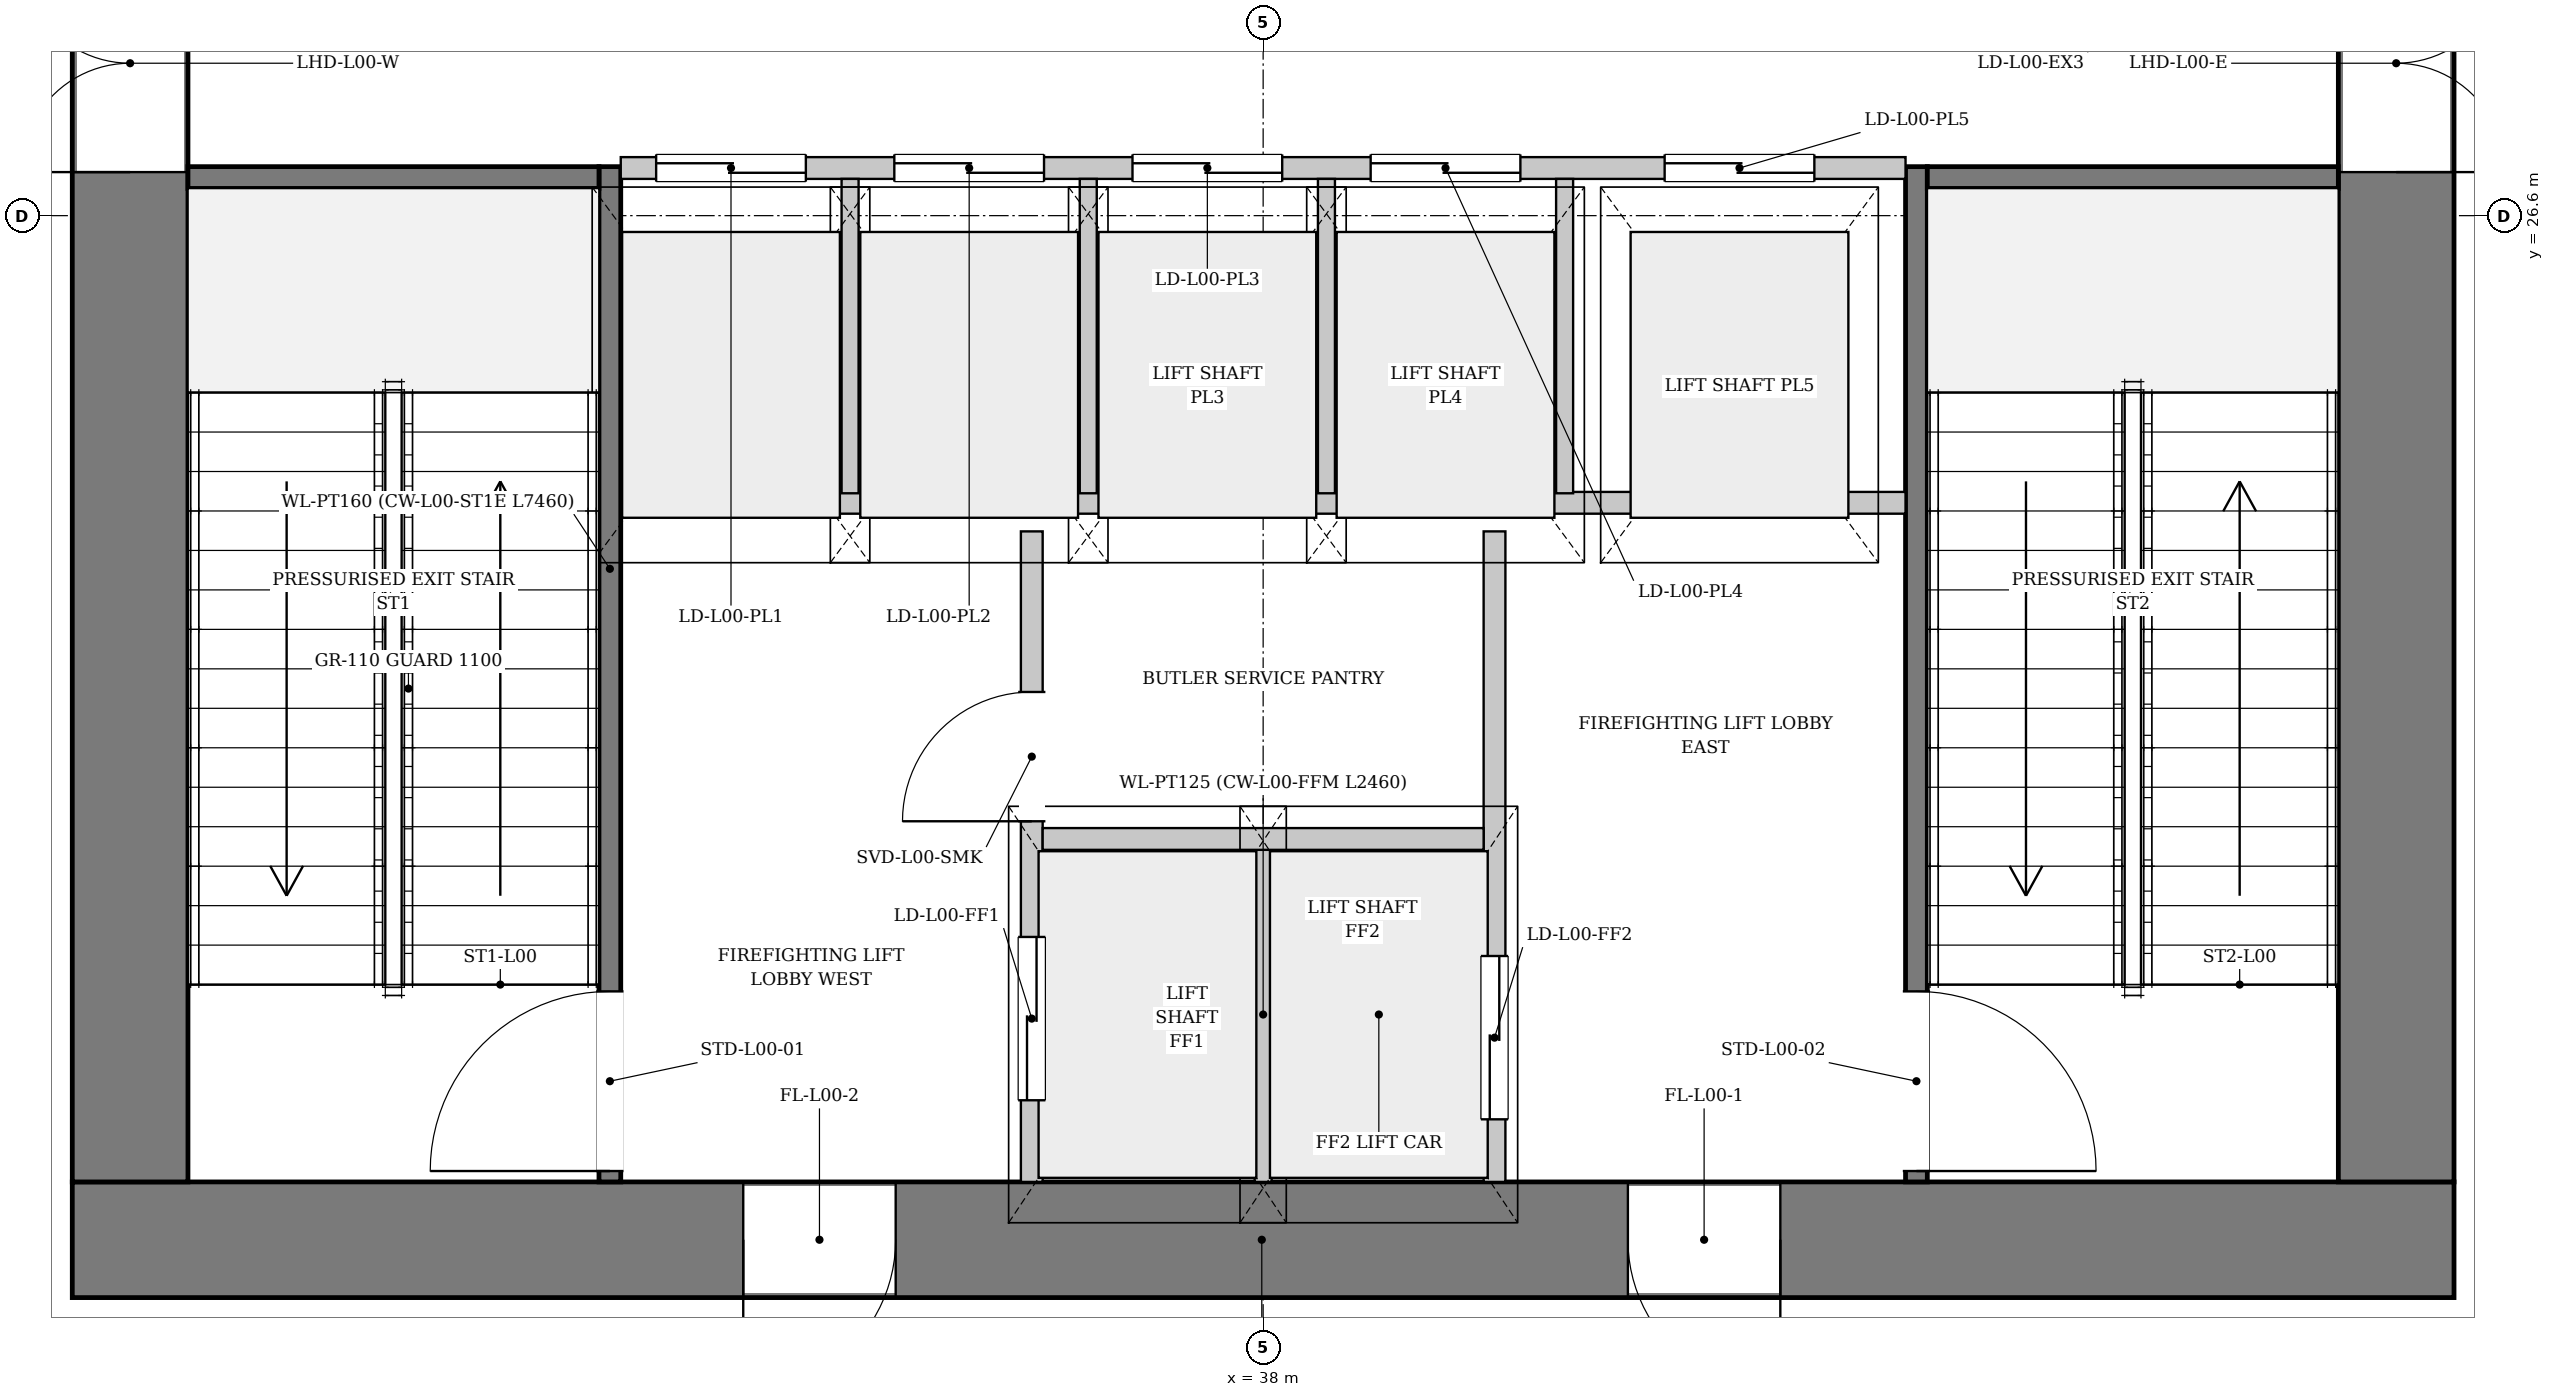
"""IFC4 building model, lengths in metres.
Left out: names, types, materials, properties, quantities, classifications, styles, units other than length and angle.
Written with IfcOpenShell. Run it as: python <this file> out.ifc"""

import sys

from ifc_helpers import new_model, si_unit, direction, frame, frame_2d, origin, place, context, subcontext, project, spatial, rectangle, extrude, source, transform, mapped, element, fill, save


model = new_model("IFC4")
c1 = context("Model", 3, precision=1e-05, world=origin(), true_north=direction((0.0, 1.0)))
c2 = subcontext(c1, "Body", "Model", "MODEL_VIEW")
j1 = project(units=[si_unit("LENGTHUNIT", "METRE"), si_unit("PLANEANGLEUNIT", "RADIAN")], contexts=[c1])
p1 = place(None, origin())
s1 = spatial("IfcSite", under=j1, at=p1, CompositionType="ELEMENT")
p2 = place(p1, origin())
s2 = spatial("IfcBuilding", under=s1, at=p2, CompositionType="ELEMENT")
p3 = place(p2, origin())
s3 = spatial("IfcBuildingStorey", under=s2, at=p3, CompositionType="ELEMENT", Elevation=0.0)
p4 = place(p3, frame((46.75, 19.075, 0.0), z_axis=(0.0, 0.0, 1.0), x_axis=(-1.0, 0.0, 0.0)))
e1 = element("IfcWall", 1, at=p4, inside=s3, PredefinedType="SHEAR", context=c2, shape_type="SweptSolid", body=[
    extrude(rectangle(XDim=17.5, YDim=0.85, at=frame_2d((8.75, 0.0))), origin(), (0.0, 0.0, 1.0), 5.08),
])
p5 = place(p4, frame((4.95, 0.0, 0.0)))
e2 = element("IfcOpeningElement", 2, at=p5, cuts=e1, PredefinedType="OPENING", context=c2, shape_type="SweptSolid", body=[
    extrude(rectangle(XDim=1.12, YDim=2.25, at=frame_2d((0.56, 1.125))), frame((0.0, 0.435, 0.0), z_axis=(0.0, -1.0, 0.0), x_axis=(1.0, 0.0, 0.0)), (0.0, 0.0, 1.0), 0.87),
])
p6 = place(p4, frame((11.45, 0.0, 0.0)))
e3 = element("IfcOpeningElement", 3, at=p6, cuts=e1, PredefinedType="OPENING", context=c2, shape_type="SweptSolid", body=[
    extrude(rectangle(XDim=1.12, YDim=2.25, at=frame_2d((0.56, 1.125))), frame((0.0, 0.435, 0.0), z_axis=(0.0, -1.0, 0.0), x_axis=(1.0, 0.0, 0.0)), (0.0, 0.0, 1.0), 0.87),
])
p7 = place(p3, frame((29.675, 19.5, 0.0), z_axis=(0.0, 0.0, 1.0), x_axis=(0.0, 1.0, 0.0)))
e4 = element("IfcWall", 4, at=p7, inside=s3, PredefinedType="SHEAR", context=c2, shape_type="SweptSolid", body=[
    extrude(rectangle(XDim=14.2, YDim=0.85, at=frame_2d((7.1, 0.0))), origin(), (0.0, 0.0, 1.0), 5.08),
])
p8 = place(p7, frame((7.42, 0.0, 0.0)))
e5 = element("IfcOpeningElement", 5, at=p8, cuts=e4, PredefinedType="OPENING", context=c2, shape_type="SweptSolid", body=[
    extrude(rectangle(XDim=1.6, YDim=2.2, at=frame_2d((0.8, 1.1))), frame((0.0, 0.435, 0.0), z_axis=(0.0, -1.0, 0.0), x_axis=(1.0, 0.0, 0.0)), (0.0, 0.0, 1.0), 0.87),
])
p9 = place(p3, frame((46.325, 33.7, 0.0), z_axis=(0.0, 0.0, 1.0), x_axis=(0.0, -1.0, 0.0)))
e6 = element("IfcWall", 6, at=p9, inside=s3, PredefinedType="SHEAR", context=c2, shape_type="SweptSolid", body=[
    extrude(rectangle(XDim=14.2, YDim=0.85, at=frame_2d((7.1, 0.0))), origin(), (0.0, 0.0, 1.0), 5.08),
])
p10 = place(p9, frame((5.18, 0.0, 0.0)))
e7 = element("IfcOpeningElement", 7, at=p10, cuts=e6, PredefinedType="OPENING", context=c2, shape_type="SweptSolid", body=[
    extrude(rectangle(XDim=1.6, YDim=2.2, at=frame_2d((0.8, 1.1))), frame((0.0, 0.435, 0.0), z_axis=(0.0, -1.0, 0.0), x_axis=(1.0, 0.0, 0.0)), (0.0, 0.0, 1.0), 0.87),
])
p11 = place(p3, frame((33.2, 19.5, 0.0), z_axis=(0.0, 0.0, 1.0), x_axis=(0.0, 1.0, 0.0)))
e8 = element("IfcWall", 8, at=p11, inside=s3, PredefinedType="PARTITIONING", context=c2, shape_type="SweptSolid", body=[
    extrude(rectangle(XDim=7.46, YDim=0.16, at=frame_2d((3.73, 0.0))), origin(), (0.0, 0.0, 1.0), 5.08),
])
p12 = place(p11, frame((0.08, 0.0, 0.0)))
e9 = element("IfcOpeningElement", 9, at=p12, cuts=e8, PredefinedType="OPENING", context=c2, shape_type="SweptSolid", body=[
    extrude(rectangle(XDim=1.32, YDim=2.2, at=frame_2d((0.66, 1.1))), frame((0.0, 0.09, 0.0), z_axis=(0.0, -1.0, 0.0), x_axis=(1.0, 0.0, 0.0)), (0.0, 0.0, 1.0), 0.18),
])
p13 = place(p3, frame((30.1, 26.88, 0.0), z_axis=(0.0, 0.0, 1.0), x_axis=(1.0, 0.0, 0.0)))
e10 = element("IfcWall", 10, at=p13, inside=s3, PredefinedType="PARTITIONING", context=c2, shape_type="SweptSolid", body=[
    extrude(rectangle(XDim=3.02, YDim=0.16, at=frame_2d((1.51, 0.0))), origin(), (0.0, 0.0, 1.0), 5.08),
])
p14 = place(p3, frame((42.8, 26.96, 0.0), z_axis=(0.0, 0.0, 1.0), x_axis=(0.0, -1.0, 0.0)))
e11 = element("IfcWall", 11, at=p14, inside=s3, PredefinedType="PARTITIONING", context=c2, shape_type="SweptSolid", body=[
    extrude(rectangle(XDim=7.46, YDim=0.16, at=frame_2d((3.73, 0.0))), origin(), (0.0, 0.0, 1.0), 5.08),
])
p15 = place(p14, frame((6.06, 0.0, 0.0)))
e12 = element("IfcOpeningElement", 12, at=p15, cuts=e11, PredefinedType="OPENING", context=c2, shape_type="SweptSolid", body=[
    extrude(rectangle(XDim=1.32, YDim=2.2, at=frame_2d((0.66, 1.1))), frame((0.0, 0.09, 0.0), z_axis=(0.0, -1.0, 0.0), x_axis=(1.0, 0.0, 0.0)), (0.0, 0.0, 1.0), 0.18),
])
p16 = place(p3, frame((42.88, 26.88, 0.0), z_axis=(0.0, 0.0, 1.0), x_axis=(1.0, 0.0, 0.0)))
e13 = element("IfcWall", 13, at=p16, inside=s3, PredefinedType="PARTITIONING", context=c2, shape_type="SweptSolid", body=[
    extrude(rectangle(XDim=3.02, YDim=0.16, at=frame_2d((1.51, 0.0))), origin(), (0.0, 0.0, 1.0), 5.08),
])
p17 = place(p3, frame((36.3, 19.5, 0.0), z_axis=(0.0, 0.0, 1.0), x_axis=(0.0, 1.0, 0.0)))
e14 = element("IfcWall", 14, at=p17, inside=s3, PredefinedType="PARTITIONING", context=c2, shape_type="SweptSolid", body=[
    extrude(rectangle(XDim=4.78, YDim=0.16, at=frame_2d((2.39, 0.0))), origin(), (0.0, 0.0, 1.0), 5.08),
])
p18 = place(p17, frame((0.6, 0.0, 0.0)))
e15 = element("IfcOpeningElement", 15, at=p18, cuts=e14, PredefinedType="OPENING", context=c2, shape_type="SweptSolid", body=[
    extrude(rectangle(XDim=1.2, YDim=2.2, at=frame_2d((0.6, 1.1))), frame((0.0, 0.09, 0.0), z_axis=(0.0, -1.0, 0.0), x_axis=(1.0, 0.0, 0.0)), (0.0, 0.0, 1.0), 0.18),
])
p19 = place(p17, frame((2.65, 0.0, 0.0)))
e16 = element("IfcOpeningElement", 16, at=p19, cuts=e14, PredefinedType="OPENING", context=c2, shape_type="SweptSolid", body=[
    extrude(rectangle(XDim=0.95, YDim=2.1, at=frame_2d((0.475, 1.05))), frame((0.0, 0.09, 0.0), z_axis=(0.0, -1.0, 0.0), x_axis=(1.0, 0.0, 0.0)), (0.0, 0.0, 1.0), 0.18),
])
p20 = place(p3, frame((39.7, 24.28, 0.0), z_axis=(0.0, 0.0, 1.0), x_axis=(0.0, -1.0, 0.0)))
e17 = element("IfcWall", 17, at=p20, inside=s3, PredefinedType="PARTITIONING", context=c2, shape_type="SweptSolid", body=[
    extrude(rectangle(XDim=4.78, YDim=0.16, at=frame_2d((2.39, 0.0))), origin(), (0.0, 0.0, 1.0), 5.08),
])
p21 = place(p20, frame((3.12, 0.0, 0.0)))
e18 = element("IfcOpeningElement", 18, at=p21, cuts=e17, PredefinedType="OPENING", context=c2, shape_type="SweptSolid", body=[
    extrude(rectangle(XDim=1.2, YDim=2.2, at=frame_2d((0.6, 1.1))), frame((0.0, 0.09, 0.0), z_axis=(0.0, -1.0, 0.0), x_axis=(1.0, 0.0, 0.0)), (0.0, 0.0, 1.0), 0.18),
])
p22 = place(p3, frame((38.0, 19.5, 0.0), z_axis=(0.0, 0.0, 1.0), x_axis=(0.0, 1.0, 0.0)))
e19 = element("IfcWall", 19, at=p22, inside=s3, PredefinedType="PARTITIONING", context=c2, shape_type="SweptSolid", body=[
    extrude(rectangle(XDim=2.46, YDim=0.125, at=frame_2d((1.23, 0.0))), origin(), (0.0, 0.0, 1.0), 5.08),
])
p23 = place(p3, frame((36.38, 22.02, 0.0), z_axis=(0.0, 0.0, 1.0), x_axis=(1.0, 0.0, 0.0)))
e20 = element("IfcWall", 20, at=p23, inside=s3, PredefinedType="PARTITIONING", context=c2, shape_type="SweptSolid", body=[
    extrude(rectangle(XDim=3.24, YDim=0.16, at=frame_2d((1.62, 0.0))), origin(), (0.0, 0.0, 1.0), 5.08),
])
p24 = place(p3, frame((33.28, 24.49, 0.0), z_axis=(0.0, 0.0, 1.0), x_axis=(1.0, 0.0, 0.0)))
e21 = element("IfcWall", 21, at=p24, inside=s3, PredefinedType="PARTITIONING", context=c2, shape_type="SweptSolid", body=[
    extrude(rectangle(XDim=9.44, YDim=0.16, at=frame_2d((4.72, 0.0))), origin(), (0.0, 0.0, 1.0), 5.08),
])
p25 = place(p3, frame((33.28, 26.95, 0.0), z_axis=(0.0, 0.0, 1.0), x_axis=(1.0, 0.0, 0.0)))
e22 = element("IfcWall", 22, at=p25, inside=s3, PredefinedType="PARTITIONING", context=c2, shape_type="SweptSolid", body=[
    extrude(rectangle(XDim=9.44, YDim=0.16, at=frame_2d((4.72, 0.0))), origin(), (0.0, 0.0, 1.0), 5.08),
])
p26 = place(p25, frame((0.26, 0.0, 0.0)))
e23 = element("IfcOpeningElement", 23, at=p26, cuts=e22, PredefinedType="OPENING", context=c2, shape_type="SweptSolid", body=[
    extrude(rectangle(XDim=1.1, YDim=2.2, at=frame_2d((0.55, 1.1))), frame((0.0, 0.09, 0.0), z_axis=(0.0, -1.0, 0.0), x_axis=(1.0, 0.0, 0.0)), (0.0, 0.0, 1.0), 0.18),
])
p27 = place(p25, frame((2.01, 0.0, 0.0)))
e24 = element("IfcOpeningElement", 24, at=p27, cuts=e22, PredefinedType="OPENING", context=c2, shape_type="SweptSolid", body=[
    extrude(rectangle(XDim=1.1, YDim=2.2, at=frame_2d((0.55, 1.1))), frame((0.0, 0.09, 0.0), z_axis=(0.0, -1.0, 0.0), x_axis=(1.0, 0.0, 0.0)), (0.0, 0.0, 1.0), 0.18),
])
p28 = place(p25, frame((3.76, 0.0, 0.0)))
e25 = element("IfcOpeningElement", 25, at=p28, cuts=e22, PredefinedType="OPENING", context=c2, shape_type="SweptSolid", body=[
    extrude(rectangle(XDim=1.1, YDim=2.2, at=frame_2d((0.55, 1.1))), frame((0.0, 0.09, 0.0), z_axis=(0.0, -1.0, 0.0), x_axis=(1.0, 0.0, 0.0)), (0.0, 0.0, 1.0), 0.18),
])
p29 = place(p25, frame((5.51, 0.0, 0.0)))
e26 = element("IfcOpeningElement", 26, at=p29, cuts=e22, PredefinedType="OPENING", context=c2, shape_type="SweptSolid", body=[
    extrude(rectangle(XDim=1.1, YDim=2.2, at=frame_2d((0.55, 1.1))), frame((0.0, 0.09, 0.0), z_axis=(0.0, -1.0, 0.0), x_axis=(1.0, 0.0, 0.0)), (0.0, 0.0, 1.0), 0.18),
])
p30 = place(p25, frame((7.67, 0.0, 0.0)))
e27 = element("IfcOpeningElement", 27, at=p30, cuts=e22, PredefinedType="OPENING", context=c2, shape_type="SweptSolid", body=[
    extrude(rectangle(XDim=1.1, YDim=2.2, at=frame_2d((0.55, 1.1))), frame((0.0, 0.09, 0.0), z_axis=(0.0, -1.0, 0.0), x_axis=(1.0, 0.0, 0.0)), (0.0, 0.0, 1.0), 0.18),
])
for number, where, z_axis, x_axis in (
    (28, (34.965, 24.56, 0.0), (0.0, 0.0, 1.0), (0.0, 1.0, 0.0)),
    (29, (36.715, 24.56, 0.0), (0.0, 0.0, 1.0), (0.0, 1.0, 0.0)),
    (30, (38.465, 24.56, 0.0), (0.0, 0.0, 1.0), (0.0, 1.0, 0.0)),
    (31, (40.215, 24.56, 0.0), (0.0, 0.0, 1.0), (0.0, 1.0, 0.0)),
):
    element("IfcWall", number, at=place(p3, frame(where, z_axis=z_axis, x_axis=x_axis)), inside=s3, PredefinedType="PARTITIONING", context=c2, shape_type="SweptSolid", body=[
        extrude(rectangle(XDim=2.31, YDim=0.125, at=frame_2d((1.155, 0.0))), origin(), (0.0, 0.0, 1.0), 5.08),
    ])
m1 = source(origin(), c2, "Body", "SweptSolid", [
    extrude(rectangle(XDim=1.12, YDim=2.25, at=frame_2d((0.56, 1.125))), frame((0.0, 0.025, 0.0), z_axis=(0.0, -1.0, 0.0), x_axis=(1.0, 0.0, 0.0)), (0.0, 0.0, 1.0), 0.05),
])
p31 = place(p5, origin())
e32 = element("IfcDoor", 32, at=p31, inside=s3, OperationType="SINGLE_SWING_LEFT", PredefinedType="DOOR", context=c2, shape_type="MappedRepresentation", body=[
    mapped(m1, transform((0.0, 0.0, 0.0), x_axis=(1.0, 0.0, 0.0), y_axis=(0.0, 1.0, 0.0), z_axis=(0.0, 0.0, 1.0), scale=1.0)),
])
fill(e2, e32)
p32 = place(p6, origin())
e33 = element("IfcDoor", 33, at=p32, inside=s3, OperationType="SINGLE_SWING_RIGHT", PredefinedType="DOOR", context=c2, shape_type="MappedRepresentation", body=[
    mapped(m1, transform((0.0, 0.0, 0.0), x_axis=(1.0, 0.0, 0.0), y_axis=(0.0, 1.0, 0.0), z_axis=(0.0, 0.0, 1.0), scale=1.0)),
])
fill(e3, e33)
m2 = source(origin(), c2, "Body", "SweptSolid", [
    extrude(rectangle(XDim=1.6, YDim=2.2, at=frame_2d((0.8, 1.1))), frame((0.0, 0.025, 0.0), z_axis=(0.0, -1.0, 0.0), x_axis=(1.0, 0.0, 0.0)), (0.0, 0.0, 1.0), 0.05),
])
p33 = place(p8, origin())
e34 = element("IfcDoor", 34, at=p33, inside=s3, OperationType="DOUBLE_DOOR_SINGLE_SWING", PredefinedType="DOOR", context=c2, shape_type="MappedRepresentation", body=[
    mapped(m2, transform((0.0, 0.0, 0.0), x_axis=(1.0, 0.0, 0.0), y_axis=(0.0, 1.0, 0.0), z_axis=(0.0, 0.0, 1.0), scale=1.0)),
])
fill(e5, e34)
p34 = place(p10, origin())
e35 = element("IfcDoor", 35, at=p34, inside=s3, OperationType="DOUBLE_DOOR_SINGLE_SWING", PredefinedType="DOOR", context=c2, shape_type="MappedRepresentation", body=[
    mapped(m2, transform((0.0, 0.0, 0.0), x_axis=(1.0, 0.0, 0.0), y_axis=(0.0, 1.0, 0.0), z_axis=(0.0, 0.0, 1.0), scale=1.0)),
])
fill(e7, e35)
m3 = source(origin(), c2, "Body", "SweptSolid", [
    extrude(rectangle(XDim=1.32, YDim=2.2, at=frame_2d((0.66, 1.1))), frame((0.0, 0.025, 0.0), z_axis=(0.0, -1.0, 0.0), x_axis=(1.0, 0.0, 0.0)), (0.0, 0.0, 1.0), 0.05),
])
p35 = place(p12, origin())
e36 = element("IfcDoor", 36, at=p35, inside=s3, OperationType="SINGLE_SWING_LEFT", PredefinedType="DOOR", context=c2, shape_type="MappedRepresentation", body=[
    mapped(m3, transform((0.0, 0.0, 0.0), x_axis=(1.0, 0.0, 0.0), y_axis=(0.0, 1.0, 0.0), z_axis=(0.0, 0.0, 1.0), scale=1.0)),
])
fill(e9, e36)
p36 = place(p15, origin())
e37 = element("IfcDoor", 37, at=p36, inside=s3, OperationType="SINGLE_SWING_RIGHT", PredefinedType="DOOR", context=c2, shape_type="MappedRepresentation", body=[
    mapped(m3, transform((0.0, 0.0, 0.0), x_axis=(1.0, 0.0, 0.0), y_axis=(0.0, 1.0, 0.0), z_axis=(0.0, 0.0, 1.0), scale=1.0)),
])
fill(e12, e37)
m4 = source(origin(), c2, "Body", "SweptSolid", [
    extrude(rectangle(XDim=1.2, YDim=2.2, at=frame_2d((0.6, 1.1))), frame((0.0, 0.025, 0.0), z_axis=(0.0, -1.0, 0.0), x_axis=(1.0, 0.0, 0.0)), (0.0, 0.0, 1.0), 0.05),
])
p37 = place(p18, origin())
e38 = element("IfcDoor", 38, at=p37, inside=s3, OperationType="DOUBLE_DOOR_SLIDING", PredefinedType="DOOR", context=c2, shape_type="MappedRepresentation", body=[
    mapped(m4, transform((0.0, 0.0, 0.0), x_axis=(1.0, 0.0, 0.0), y_axis=(0.0, 1.0, 0.0), z_axis=(0.0, 0.0, 1.0), scale=1.0)),
])
fill(e15, e38)
m5 = source(origin(), c2, "Body", "SweptSolid", [
    extrude(rectangle(XDim=0.95, YDim=2.1, at=frame_2d((0.475, 1.05))), frame((0.0, 0.025, 0.0), z_axis=(0.0, -1.0, 0.0), x_axis=(1.0, 0.0, 0.0)), (0.0, 0.0, 1.0), 0.05),
])
p38 = place(p19, origin())
e39 = element("IfcDoor", 39, at=p38, inside=s3, OperationType="SINGLE_SWING_LEFT", PredefinedType="DOOR", context=c2, shape_type="MappedRepresentation", body=[
    mapped(m5, transform((0.0, 0.0, 0.0), x_axis=(1.0, 0.0, 0.0), y_axis=(0.0, 1.0, 0.0), z_axis=(0.0, 0.0, 1.0), scale=1.0)),
])
fill(e16, e39)
p39 = place(p21, origin())
e40 = element("IfcDoor", 40, at=p39, inside=s3, OperationType="DOUBLE_DOOR_SLIDING", PredefinedType="DOOR", context=c2, shape_type="MappedRepresentation", body=[
    mapped(m4, transform((0.0, 0.0, 0.0), x_axis=(1.0, 0.0, 0.0), y_axis=(0.0, 1.0, 0.0), z_axis=(0.0, 0.0, 1.0), scale=1.0)),
])
fill(e18, e40)
m6 = source(origin(), c2, "Body", "SweptSolid", [
    extrude(rectangle(XDim=1.1, YDim=2.2, at=frame_2d((0.55, 1.1))), frame((0.0, 0.025, 0.0), z_axis=(0.0, -1.0, 0.0), x_axis=(1.0, 0.0, 0.0)), (0.0, 0.0, 1.0), 0.05),
])
p40 = place(p26, origin())
e41 = element("IfcDoor", 41, at=p40, inside=s3, OperationType="DOUBLE_DOOR_SLIDING", PredefinedType="DOOR", context=c2, shape_type="MappedRepresentation", body=[
    mapped(m6, transform((0.0, 0.0, 0.0), x_axis=(1.0, 0.0, 0.0), y_axis=(0.0, 1.0, 0.0), z_axis=(0.0, 0.0, 1.0), scale=1.0)),
])
fill(e23, e41)
p41 = place(p27, origin())
e42 = element("IfcDoor", 42, at=p41, inside=s3, OperationType="DOUBLE_DOOR_SLIDING", PredefinedType="DOOR", context=c2, shape_type="MappedRepresentation", body=[
    mapped(m6, transform((0.0, 0.0, 0.0), x_axis=(1.0, 0.0, 0.0), y_axis=(0.0, 1.0, 0.0), z_axis=(0.0, 0.0, 1.0), scale=1.0)),
])
fill(e24, e42)
p42 = place(p28, origin())
e43 = element("IfcDoor", 43, at=p42, inside=s3, OperationType="DOUBLE_DOOR_SLIDING", PredefinedType="DOOR", context=c2, shape_type="MappedRepresentation", body=[
    mapped(m6, transform((0.0, 0.0, 0.0), x_axis=(1.0, 0.0, 0.0), y_axis=(0.0, 1.0, 0.0), z_axis=(0.0, 0.0, 1.0), scale=1.0)),
])
fill(e25, e43)
p43 = place(p29, origin())
e44 = element("IfcDoor", 44, at=p43, inside=s3, OperationType="DOUBLE_DOOR_SLIDING", PredefinedType="DOOR", context=c2, shape_type="MappedRepresentation", body=[
    mapped(m6, transform((0.0, 0.0, 0.0), x_axis=(1.0, 0.0, 0.0), y_axis=(0.0, 1.0, 0.0), z_axis=(0.0, 0.0, 1.0), scale=1.0)),
])
fill(e26, e44)
p44 = place(p30, origin())
e45 = element("IfcDoor", 45, at=p44, inside=s3, OperationType="DOUBLE_DOOR_SLIDING", PredefinedType="DOOR", context=c2, shape_type="MappedRepresentation", body=[
    mapped(m6, transform((0.0, 0.0, 0.0), x_axis=(1.0, 0.0, 0.0), y_axis=(0.0, 1.0, 0.0), z_axis=(0.0, 0.0, 1.0), scale=1.0)),
])
fill(e27, e45)
save(model, sys.argv[1])
